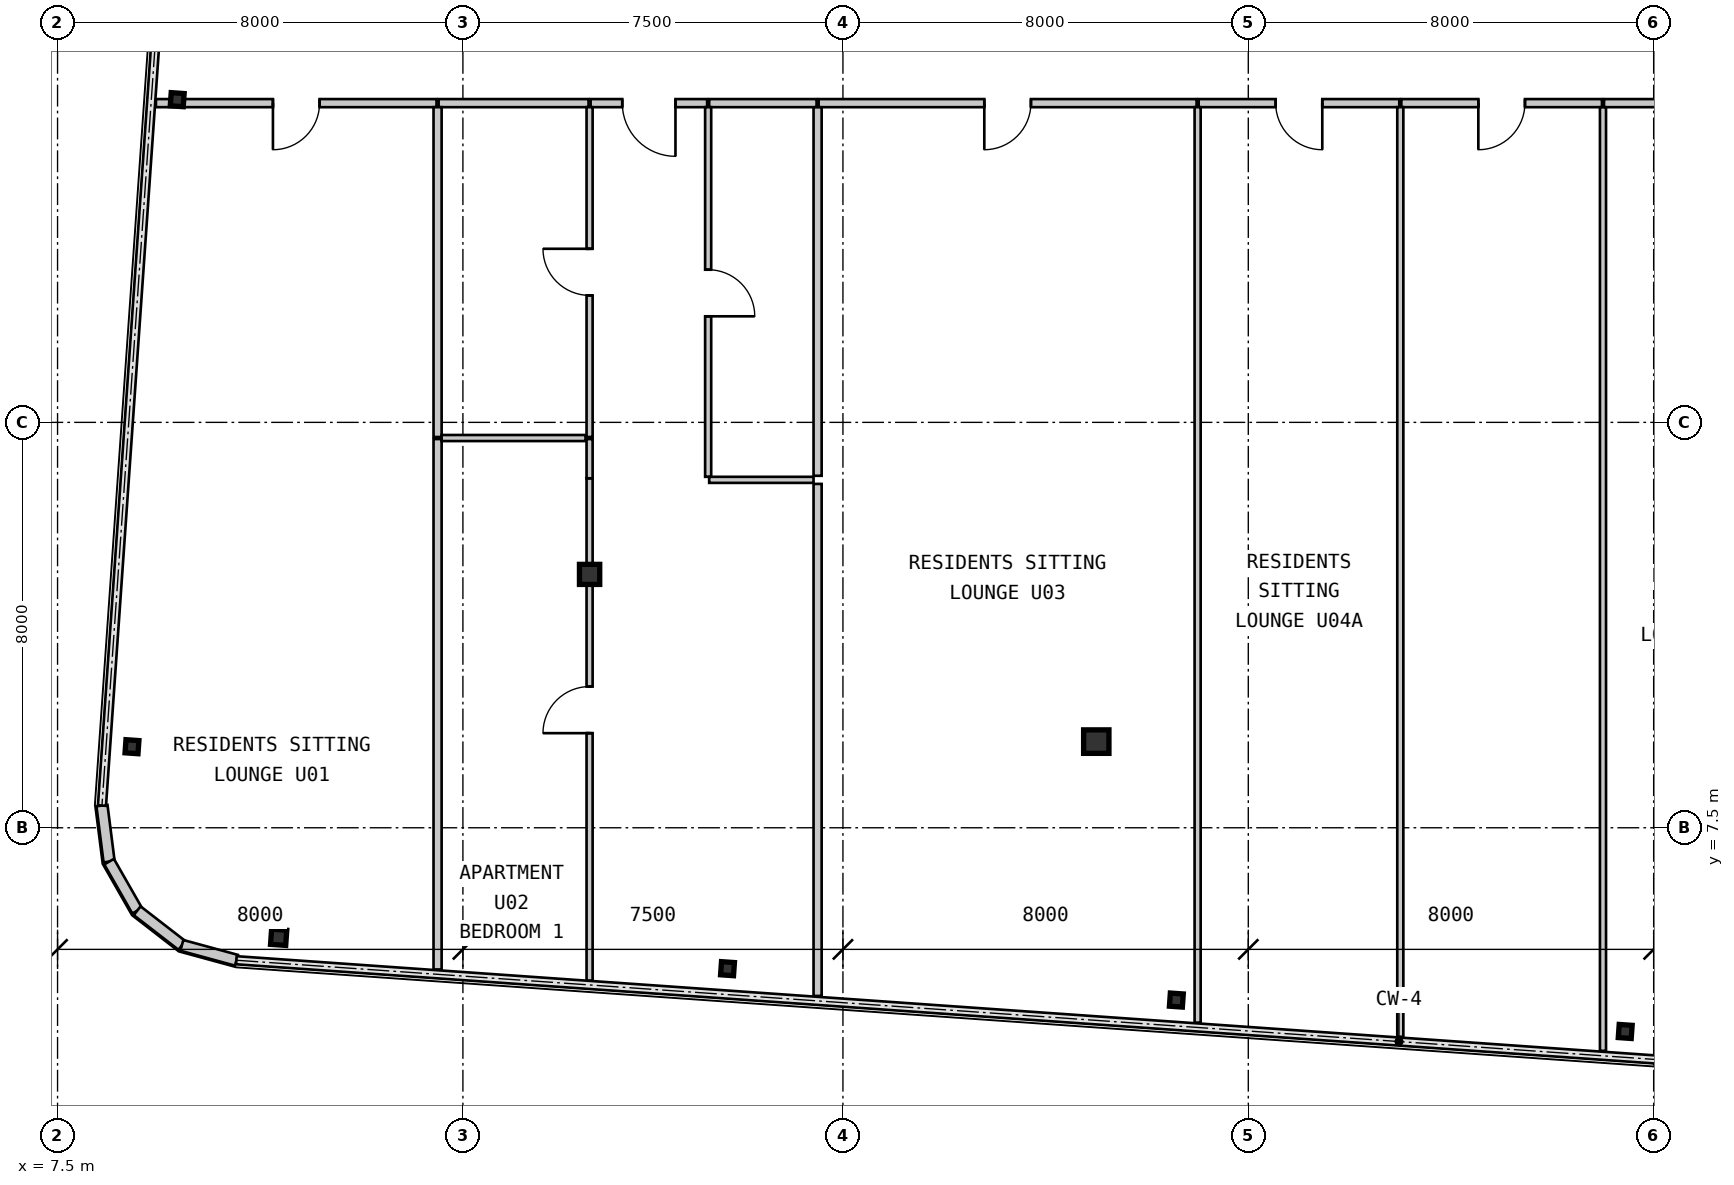
"""IFC4 building model, lengths in metres.
Left out: names, types, materials, properties, quantities, classifications, styles, units other than length and angle.
Written with IfcOpenShell. Run it as: python <this file> out.ifc"""

import sys

from ifc_helpers import new_model, si_unit, direction, frame, frame_2d, origin, origin_2d, place, context, subcontext, project, spatial, rectangle, hollow_rectangle, i_section, extrude, source, transform, mapped, element, fill, save


model = new_model("IFC4")
c1 = context("Model", 3, precision=1e-05, world=origin(), true_north=direction((0.0, 1.0)))
c2 = subcontext(c1, "Body", "Model", "MODEL_VIEW")
j1 = project(units=[si_unit("LENGTHUNIT", "METRE"), si_unit("PLANEANGLEUNIT", "RADIAN")], contexts=[c1])
p1 = place(None, origin())
s1 = spatial("IfcSite", under=j1, at=p1, CompositionType="ELEMENT")
p2 = place(p1, origin())
s2 = spatial("IfcBuilding", under=s1, at=p2, CompositionType="ELEMENT")
p3 = place(p2, frame((0.0, 0.0, 139.3)))
s3 = spatial("IfcBuildingStorey", under=s2, at=p3, CompositionType="ELEMENT", Elevation=139.3)
m1 = source(origin(), c2, "Body", "SweptSolid", [
    extrude(i_section(OverallWidth=0.5, OverallDepth=0.464, WebThickness=0.022, FlangeThickness=0.034, at=origin_2d()), origin(), (0.0, 0.0, 1.0), 3.15),
])
p4 = place(p3, frame((28.0, 9.2, 0.0), z_axis=(0.0, 0.0, 1.0), x_axis=(1.0, 0.0, 0.0)))
e1 = element("IfcColumn", 1, at=p4, inside=s3, PredefinedType="COLUMN", context=c2, shape_type="MappedRepresentation", body=[
    mapped(m1, transform((0.0, 0.0, 0.0), scale=1.0)),
])
m2 = source(origin(), c2, "Body", "SweptSolid", [
    extrude(i_section(OverallWidth=0.4, OverallDepth=0.396, WebThickness=0.022, FlangeThickness=0.034, at=origin_2d()), origin(), (0.0, 0.0, 1.0), 3.15),
])
p5 = place(p3, frame((18.0, 12.5, 0.0), z_axis=(0.0, 0.0, 1.0), x_axis=(1.0, 0.0, 0.0)))
e2 = element("IfcColumn", 2, at=p5, inside=s3, PredefinedType="COLUMN", context=c2, shape_type="MappedRepresentation", body=[
    mapped(m2, transform((0.0, 0.0, 0.0), scale=1.0)),
])
m3 = source(origin(), c2, "Body", "SweptSolid", [
    extrude(hollow_rectangle(XDim=0.3, YDim=0.3, WallThickness=0.012, at=origin_2d()), origin(), (0.0, 0.0, 1.0), 3.15),
])
p6 = place(p3, frame((11.864, 5.338, 0.0), z_axis=(0.0, 0.0, 1.0), x_axis=(0.99756405026, -0.069756473744, 0.0)))
e3 = element("IfcColumn", 3, at=p6, inside=s3, PredefinedType="COLUMN", context=c2, shape_type="MappedRepresentation", body=[
    mapped(m3, transform((0.0, 0.0, 0.0), scale=1.0)),
])
m4 = source(origin(), c2, "Body", "SweptSolid", [
    extrude(i_section(OverallWidth=0.256, OverallDepth=0.26, WebThickness=0.01, FlangeThickness=0.017, at=origin_2d()), origin(), (0.0, 0.0, 1.0), 3.15),
])
for number, where, z_axis, x_axis in (
    (4, (20.722, 4.719, 0.0), (0.0, 0.0, 1.0), (0.998, -0.07, 0.0)),
    (5, (29.58, 4.1, 0.0), (0.0, 0.0, 1.0), (0.998, -0.07, 0.0)),
    (6, (38.439, 3.48, 0.0), (0.0, 0.0, 1.0), (0.998, -0.07, 0.0)),
    (7, (8.969, 9.1, 0.0), (0.0, 0.0, 1.0), (0.998, -0.07, 0.0)),
    (8, (9.862, 21.868, 0.0), (0.0, 0.0, 1.0), (0.998, -0.07, 0.0)),
):
    element("IfcColumn", number, at=place(p3, frame(where, z_axis=z_axis, x_axis=x_axis)), inside=s3, PredefinedType="COLUMN", context=c2, shape_type="MappedRepresentation", body=[
        mapped(m4, transform((0.0, 0.0, 0.0), scale=1.0)),
    ])
m5 = source(origin(), c2, "Body", "SweptSolid", [
    extrude(rectangle(XDim=1.116, YDim=0.22, at=frame_2d((0.558, 0.0))), origin(), (0.0, 0.0, 1.0), 2.93),
])
for number, where, z_axis, x_axis in (
    (9, (8.376, 7.938, 0.0), (0.0, 0.0, 1.0), (0.126, -0.992, 0.0)),
    (10, (8.517, 6.831, 0.0), (0.0, 0.0, 1.0), (0.496, -0.868, 0.0)),
    (11, (9.071, 5.862, 0.0), (0.0, 0.0, 1.0), (0.791, -0.612, 0.0)),
    (12, (9.953, 5.179, 0.0), (0.0, 0.0, 1.0), (0.965, -0.263, 0.0)),
):
    element("IfcWall", number, at=place(p3, frame(where, z_axis=z_axis, x_axis=x_axis)), inside=s3, PredefinedType="SOLIDWALL", context=c2, shape_type="MappedRepresentation", body=[
        mapped(m5, transform((0.0, 0.0, 0.0), scale=1.0)),
    ])
m6 = source(origin(), c2, "Body", "SweptSolid", [
    extrude(rectangle(XDim=5.538, YDim=0.16, at=frame_2d((2.769, 0.0))), origin(), (0.0, 0.0, 1.0), 2.93),
])
p7 = place(p3, frame((14.98, 21.8, 0.0), z_axis=(0.0, 0.0, 1.0), x_axis=(-1.0, 0.0, 0.0)))
e13 = element("IfcWall", 13, at=p7, inside=s3, PredefinedType="PARTITIONING", context=c2, shape_type="MappedRepresentation", body=[
    mapped(m6, transform((0.0, 0.0, 0.0), scale=1.0)),
])
m7 = source(origin(), c2, "Body", "SweptSolid", [
    extrude(rectangle(XDim=0.92, YDim=2.1, at=frame_2d((0.46, 1.05))), frame((0.0, 0.09, 0.0), z_axis=(0.0, -1.0, 0.0), x_axis=(1.0, 0.0, 0.0)), (0.0, 0.0, 1.0), 0.18),
])
p8 = place(p7, frame((2.309, 0.0, 0.0)))
e14 = element("IfcOpeningElement", 14, at=p8, cuts=e13, PredefinedType="OPENING", context=c2, shape_type="MappedRepresentation", body=[
    mapped(m7, transform((0.0, 0.0, 0.0), scale=1.0)),
])
m8 = source(origin(), c2, "Body", "SweptSolid", [
    extrude(rectangle(XDim=2.3, YDim=0.16, at=frame_2d((1.15, 0.0))), origin(), (0.0, 0.0, 1.0), 2.93),
])
p9 = place(p3, frame((20.32, 21.8, 0.0), z_axis=(0.0, 0.0, 1.0), x_axis=(-1.0, 0.0, 0.0)))
e15 = element("IfcWall", 15, at=p9, inside=s3, PredefinedType="PARTITIONING", context=c2, shape_type="MappedRepresentation", body=[
    mapped(m8, transform((0.0, 0.0, 0.0), scale=1.0)),
])
m9 = source(origin(), c2, "Body", "SweptSolid", [
    extrude(rectangle(XDim=1.05, YDim=2.1, at=frame_2d((0.525, 1.05))), frame((0.0, 0.09, 0.0), z_axis=(0.0, -1.0, 0.0), x_axis=(1.0, 0.0, 0.0)), (0.0, 0.0, 1.0), 0.18),
])
p10 = place(p9, frame((0.625, 0.0, 0.0)))
e16 = element("IfcOpeningElement", 16, at=p10, cuts=e15, PredefinedType="OPENING", context=c2, shape_type="MappedRepresentation", body=[
    mapped(m9, transform((0.0, 0.0, 0.0), scale=1.0)),
])
m10 = source(origin(), c2, "Body", "SweptSolid", [
    extrude(rectangle(XDim=2.12, YDim=0.16, at=frame_2d((1.06, 0.0))), origin(), (0.0, 0.0, 1.0), 2.93),
])
p11 = place(p3, frame((22.48, 21.8, 0.0), z_axis=(0.0, 0.0, 1.0), x_axis=(-1.0, 0.0, 0.0)))
e17 = element("IfcWall", 17, at=p11, inside=s3, PredefinedType="PARTITIONING", context=c2, shape_type="MappedRepresentation", body=[
    mapped(m10, transform((0.0, 0.0, 0.0), scale=1.0)),
])
m11 = source(origin(), c2, "Body", "SweptSolid", [
    extrude(rectangle(XDim=2.959, YDim=0.16, at=frame_2d((1.48, 0.0))), origin(), (0.0, 0.0, 1.0), 2.93),
])
p12 = place(p3, frame((17.98, 21.8, 0.0), z_axis=(0.0, 0.0, 1.0), x_axis=(-1.0, 0.0, 0.0)))
e18 = element("IfcWall", 18, at=p12, inside=s3, PredefinedType="PARTITIONING", context=c2, shape_type="MappedRepresentation", body=[
    mapped(m11, transform((0.0, 0.0, 0.0), scale=1.0)),
])
m12 = source(origin(), c2, "Body", "SweptSolid", [
    extrude(rectangle(XDim=7.459, YDim=0.16, at=frame_2d((3.73, 0.0))), origin(), (0.0, 0.0, 1.0), 2.93),
])
p13 = place(p3, frame((29.98, 21.8, 0.0), z_axis=(0.0, 0.0, 1.0), x_axis=(-1.0, 0.0, 0.0)))
e19 = element("IfcWall", 19, at=p13, inside=s3, PredefinedType="PARTITIONING", context=c2, shape_type="MappedRepresentation", body=[
    mapped(m12, transform((0.0, 0.0, 0.0), scale=1.0)),
])
p14 = place(p13, frame((3.27, 0.0, 0.0)))
e20 = element("IfcOpeningElement", 20, at=p14, cuts=e19, PredefinedType="OPENING", context=c2, shape_type="MappedRepresentation", body=[
    mapped(m7, transform((0.0, 0.0, 0.0), scale=1.0)),
])
m13 = source(origin(), c2, "Body", "SweptSolid", [
    extrude(rectangle(XDim=3.959, YDim=0.16, at=frame_2d((1.98, 0.0))), origin(), (0.0, 0.0, 1.0), 2.93),
])
p15 = place(p3, frame((33.98, 21.8, 0.0), z_axis=(0.0, 0.0, 1.0), x_axis=(-1.0, 0.0, 0.0)))
e21 = element("IfcWall", 21, at=p15, inside=s3, PredefinedType="PARTITIONING", context=c2, shape_type="MappedRepresentation", body=[
    mapped(m13, transform((0.0, 0.0, 0.0), scale=1.0)),
])
p16 = place(p15, frame((1.52, 0.0, 0.0)))
e22 = element("IfcOpeningElement", 22, at=p16, cuts=e21, PredefinedType="OPENING", context=c2, shape_type="MappedRepresentation", body=[
    mapped(m7, transform((0.0, 0.0, 0.0), scale=1.0)),
])
p17 = place(p3, frame((37.98, 21.8, 0.0), z_axis=(0.0, 0.0, 1.0), x_axis=(-1.0, 0.0, 0.0)))
e23 = element("IfcWall", 23, at=p17, inside=s3, PredefinedType="PARTITIONING", context=c2, shape_type="MappedRepresentation", body=[
    mapped(m13, transform((0.0, 0.0, 0.0), scale=1.0)),
])
p18 = place(p17, frame((1.52, 0.0, 0.0)))
e24 = element("IfcOpeningElement", 24, at=p18, cuts=e23, PredefinedType="OPENING", context=c2, shape_type="MappedRepresentation", body=[
    mapped(m7, transform((0.0, 0.0, 0.0), scale=1.0)),
])
p19 = place(p3, frame((41.98, 21.8, 0.0), z_axis=(0.0, 0.0, 1.0), x_axis=(-1.0, 0.0, 0.0)))
e25 = element("IfcWall", 25, at=p19, inside=s3, PredefinedType="PARTITIONING", context=c2, shape_type="MappedRepresentation", body=[
    mapped(m13, transform((0.0, 0.0, 0.0), scale=1.0)),
])
p20 = place(p19, frame((1.52, 0.0, 0.0)))
e26 = element("IfcOpeningElement", 26, at=p20, cuts=e25, PredefinedType="OPENING", context=c2, shape_type="MappedRepresentation", body=[
    mapped(m7, transform((0.0, 0.0, 0.0), scale=1.0)),
])
m14 = source(origin(), c2, "Body", "SweptSolid", [
    extrude(rectangle(XDim=10.467, YDim=0.16, at=frame_2d((5.234, 0.0))), origin(), (0.0, 0.0, 1.0), 2.93),
])
p21 = place(p3, frame((15.0, 15.171, 0.0), z_axis=(0.0, 0.0, 1.0), x_axis=(0.0, -1.0, 0.0)))
e27 = element("IfcWall", 27, at=p21, inside=s3, PredefinedType="PARTITIONING", context=c2, shape_type="MappedRepresentation", body=[
    mapped(m14, transform((0.0, 0.0, 0.0), scale=1.0)),
])
m15 = source(origin(), c2, "Body", "SweptSolid", [
    extrude(rectangle(XDim=6.509, YDim=0.16, at=frame_2d((3.254, 0.0))), origin(), (0.0, 0.0, 1.0), 2.93),
])
p22 = place(p3, frame((15.0, 21.72, 0.0), z_axis=(0.0, 0.0, 1.0), x_axis=(0.0, -1.0, 0.0)))
e28 = element("IfcWall", 28, at=p22, inside=s3, PredefinedType="PARTITIONING", context=c2, shape_type="MappedRepresentation", body=[
    mapped(m15, transform((0.0, 0.0, 0.0), scale=1.0)),
])
m16 = source(origin(), c2, "Body", "SweptSolid", [
    extrude(rectangle(XDim=7.294, YDim=0.12, at=frame_2d((3.647, 0.0))), origin(), (0.0, 0.0, 1.0), 2.93),
])
p23 = place(p3, frame((20.34, 21.72, 0.0), z_axis=(0.0, 0.0, 1.0), x_axis=(0.0, -1.0, 0.0)))
e29 = element("IfcWall", 29, at=p23, inside=s3, PredefinedType="PARTITIONING", context=c2, shape_type="MappedRepresentation", body=[
    mapped(m16, transform((0.0, 0.0, 0.0), scale=1.0)),
])
m17 = source(origin(), c2, "Body", "SweptSolid", [
    extrude(rectangle(XDim=0.92, YDim=2.1, at=frame_2d((0.46, 1.05))), frame((0.0, 0.07, 0.0), z_axis=(0.0, -1.0, 0.0), x_axis=(1.0, 0.0, 0.0)), (0.0, 0.0, 1.0), 0.14),
])
p24 = place(p23, frame((3.207, 0.0, 0.0)))
e30 = element("IfcOpeningElement", 30, at=p24, cuts=e29, PredefinedType="OPENING", context=c2, shape_type="MappedRepresentation", body=[
    mapped(m17, transform((0.0, 0.0, 0.0), scale=1.0)),
])
m18 = source(origin(), c2, "Body", "SweptSolid", [
    extrude(rectangle(XDim=2.06, YDim=0.12, at=frame_2d((1.03, 0.0))), origin(), (0.0, 0.0, 1.0), 2.93),
])
p25 = place(p3, frame((20.36, 14.366, 0.0), z_axis=(0.0, 0.0, 1.0), x_axis=(1.0, 0.0, 0.0)))
e31 = element("IfcWall", 31, at=p25, inside=s3, PredefinedType="PARTITIONING", context=c2, shape_type="MappedRepresentation", body=[
    mapped(m18, transform((0.0, 0.0, 0.0), scale=1.0)),
])
m19 = source(origin(), c2, "Body", "SweptSolid", [
    extrude(rectangle(XDim=8.012, YDim=0.12, at=frame_2d((4.006, 0.0))), origin(), (0.0, 0.0, 1.0), 2.93),
])
p26 = place(p3, frame((18.0, 4.483, 0.0), z_axis=(0.0, 0.0, 1.0), x_axis=(0.0, 1.0, 0.0)))
e32 = element("IfcWall", 32, at=p26, inside=s3, PredefinedType="PARTITIONING", context=c2, shape_type="MappedRepresentation", body=[
    mapped(m19, transform((0.0, 0.0, 0.0), scale=1.0)),
])
p27 = place(p26, frame((4.884, 0.0, 0.0)))
e33 = element("IfcOpeningElement", 33, at=p27, cuts=e32, PredefinedType="OPENING", context=c2, shape_type="MappedRepresentation", body=[
    mapped(m17, transform((0.0, 0.0, 0.0), scale=1.0)),
])
m20 = source(origin(), c2, "Body", "SweptSolid", [
    extrude(rectangle(XDim=1.901, YDim=0.12, at=frame_2d((0.951, 0.0))), origin(), (0.0, 0.0, 1.0), 2.397),
])
p28 = place(p3, frame((18.0, 12.495, 0.0), z_axis=(0.0, 0.0, 1.0), x_axis=(0.0, 1.0, 0.0)))
e34 = element("IfcWall", 34, at=p28, inside=s3, PredefinedType="PARTITIONING", context=c2, shape_type="MappedRepresentation", body=[
    mapped(m20, transform((0.0, 0.0, 0.0), scale=1.0)),
])
m21 = source(origin(), c2, "Body", "SweptSolid", [
    extrude(rectangle(XDim=0.775, YDim=0.12, at=frame_2d((0.387, 0.0))), origin(), (0.0, 0.0, 1.0), 2.93),
])
p29 = place(p3, frame((18.0, 14.396, 0.0), z_axis=(0.0, 0.0, 1.0), x_axis=(0.0, 1.0, 0.0)))
e35 = element("IfcWall", 35, at=p29, inside=s3, PredefinedType="PARTITIONING", context=c2, shape_type="MappedRepresentation", body=[
    mapped(m21, transform((0.0, 0.0, 0.0), scale=1.0)),
])
m22 = source(origin(), c2, "Body", "SweptSolid", [
    extrude(rectangle(XDim=6.509, YDim=0.12, at=frame_2d((3.254, 0.0))), origin(), (0.0, 0.0, 1.0), 2.93),
])
p30 = place(p3, frame((18.0, 15.211, 0.0), z_axis=(0.0, 0.0, 1.0), x_axis=(0.0, 1.0, 0.0)))
e36 = element("IfcWall", 36, at=p30, inside=s3, PredefinedType="PARTITIONING", context=c2, shape_type="MappedRepresentation", body=[
    mapped(m22, transform((0.0, 0.0, 0.0), scale=1.0)),
])
p31 = place(p30, frame((2.794, 0.0, 0.0)))
e37 = element("IfcOpeningElement", 37, at=p31, cuts=e36, PredefinedType="OPENING", context=c2, shape_type="MappedRepresentation", body=[
    mapped(m17, transform((0.0, 0.0, 0.0), scale=1.0)),
])
m23 = source(origin(), c2, "Body", "SweptSolid", [
    extrude(rectangle(XDim=10.104, YDim=0.16, at=frame_2d((5.052, 0.0))), origin(), (0.0, 0.0, 1.0), 2.93),
])
p32 = place(p3, frame((22.5, 14.286, 0.0), z_axis=(0.0, 0.0, 1.0), x_axis=(0.0, -1.0, 0.0)))
e38 = element("IfcWall", 38, at=p32, inside=s3, PredefinedType="PARTITIONING", context=c2, shape_type="MappedRepresentation", body=[
    mapped(m23, transform((0.0, 0.0, 0.0), scale=1.0)),
])
m24 = source(origin(), c2, "Body", "SweptSolid", [
    extrude(rectangle(XDim=7.272, YDim=0.16, at=frame_2d((3.636, 0.0))), origin(), (0.0, 0.0, 1.0), 2.93),
])
p33 = place(p3, frame((22.5, 21.718, 0.0), z_axis=(0.0, 0.0, 1.0), x_axis=(0.0, -1.0, 0.0)))
e39 = element("IfcWall", 39, at=p33, inside=s3, PredefinedType="PARTITIONING", context=c2, shape_type="MappedRepresentation", body=[
    mapped(m24, transform((0.0, 0.0, 0.0), scale=1.0)),
])
m25 = source(origin(), c2, "Body", "SweptSolid", [
    extrude(rectangle(XDim=2.84, YDim=0.12, at=frame_2d((1.42, 0.0))), origin(), (0.0, 0.0, 1.0), 2.93),
])
p34 = place(p3, frame((15.08, 15.191, 0.0), z_axis=(0.0, 0.0, 1.0), x_axis=(1.0, 0.0, 0.0)))
e40 = element("IfcWall", 40, at=p34, inside=s3, PredefinedType="PARTITIONING", context=c2, shape_type="MappedRepresentation", body=[
    mapped(m25, transform((0.0, 0.0, 0.0), scale=1.0)),
])
m26 = source(origin(), c2, "Body", "SweptSolid", [
    extrude(rectangle(XDim=18.065, YDim=0.12, at=frame_2d((9.033, 0.0))), origin(), (0.0, 0.0, 1.0), 2.93),
])
p35 = place(p3, frame((30.0, 21.72, 0.0), z_axis=(0.0, 0.0, 1.0), x_axis=(0.0, -1.0, 0.0)))
e41 = element("IfcWall", 41, at=p35, inside=s3, PredefinedType="PARTITIONING", context=c2, shape_type="MappedRepresentation", body=[
    mapped(m26, transform((0.0, 0.0, 0.0), scale=1.0)),
])
m27 = source(origin(), c2, "Body", "SweptSolid", [
    extrude(rectangle(XDim=18.345, YDim=0.12, at=frame_2d((9.172, 0.0))), origin(), (0.0, 0.0, 1.0), 2.93),
])
p36 = place(p3, frame((34.0, 21.72, 0.0), z_axis=(0.0, 0.0, 1.0), x_axis=(0.0, -1.0, 0.0)))
e42 = element("IfcWall", 42, at=p36, inside=s3, PredefinedType="PARTITIONING", context=c2, shape_type="MappedRepresentation", body=[
    mapped(m27, transform((0.0, 0.0, 0.0), scale=1.0)),
])
m28 = source(origin(), c2, "Body", "SweptSolid", [
    extrude(rectangle(XDim=18.621, YDim=0.12, at=frame_2d((9.31, 0.0))), origin(), (0.0, 0.0, 1.0), 2.93),
])
p37 = place(p3, frame((38.0, 21.718, 0.0), z_axis=(0.0, 0.0, 1.0), x_axis=(0.0, -1.0, 0.0)))
e43 = element("IfcWall", 43, at=p37, inside=s3, PredefinedType="PARTITIONING", context=c2, shape_type="MappedRepresentation", body=[
    mapped(m28, transform((0.0, 0.0, 0.0), scale=1.0)),
])
m29 = source(origin(), c2, "Body", "SweptSolid", [
    extrude(rectangle(XDim=0.92, YDim=2.1, at=frame_2d((0.46, 1.05))), frame((0.0, 0.025, 0.0), z_axis=(0.0, -1.0, 0.0), x_axis=(1.0, 0.0, 0.0)), (0.0, 0.0, 1.0), 0.05),
])
p38 = place(p8, origin())
e44 = element("IfcDoor", 44, at=p38, inside=s3, OperationType="SINGLE_SWING_RIGHT", PredefinedType="DOOR", context=c2, shape_type="MappedRepresentation", body=[
    mapped(m29, transform((0.0, 0.0, 0.0), scale=1.0)),
])
fill(e14, e44)
m30 = source(origin(), c2, "Body", "SweptSolid", [
    extrude(rectangle(XDim=1.05, YDim=2.1, at=frame_2d((0.525, 1.05))), frame((0.0, 0.025, 0.0), z_axis=(0.0, -1.0, 0.0), x_axis=(1.0, 0.0, 0.0)), (0.0, 0.0, 1.0), 0.05),
])
p39 = place(p10, origin())
e45 = element("IfcDoor", 45, at=p39, inside=s3, OperationType="SINGLE_SWING_LEFT", PredefinedType="DOOR", context=c2, shape_type="MappedRepresentation", body=[
    mapped(m30, transform((0.0, 0.0, 0.0), scale=1.0)),
])
fill(e16, e45)
p40 = place(p14, origin())
e46 = element("IfcDoor", 46, at=p40, inside=s3, OperationType="SINGLE_SWING_RIGHT", PredefinedType="DOOR", context=c2, shape_type="MappedRepresentation", body=[
    mapped(m29, transform((0.0, 0.0, 0.0), scale=1.0)),
])
fill(e20, e46)
p41 = place(p16, origin())
e47 = element("IfcDoor", 47, at=p41, inside=s3, OperationType="SINGLE_SWING_LEFT", PredefinedType="DOOR", context=c2, shape_type="MappedRepresentation", body=[
    mapped(m29, transform((0.0, 0.0, 0.0), scale=1.0)),
])
fill(e22, e47)
p42 = place(p18, origin())
e48 = element("IfcDoor", 48, at=p42, inside=s3, OperationType="SINGLE_SWING_RIGHT", PredefinedType="DOOR", context=c2, shape_type="MappedRepresentation", body=[
    mapped(m29, transform((0.0, 0.0, 0.0), scale=1.0)),
])
fill(e24, e48)
p43 = place(p24, origin())
e49 = element("IfcDoor", 49, at=p43, inside=s3, OperationType="SINGLE_SWING_RIGHT", PredefinedType="DOOR", context=c2, shape_type="MappedRepresentation", body=[
    mapped(m29, transform((0.0, 0.0, 0.0), scale=1.0)),
])
fill(e30, e49)
p44 = place(p27, origin())
e50 = element("IfcDoor", 50, at=p44, inside=s3, OperationType="SINGLE_SWING_LEFT", PredefinedType="DOOR", context=c2, shape_type="MappedRepresentation", body=[
    mapped(m29, transform((0.0, 0.0, 0.0), scale=1.0)),
])
fill(e33, e50)
p45 = place(p31, origin())
e51 = element("IfcDoor", 51, at=p45, inside=s3, OperationType="SINGLE_SWING_RIGHT", PredefinedType="DOOR", context=c2, shape_type="MappedRepresentation", body=[
    mapped(m29, transform((0.0, 0.0, 0.0), scale=1.0)),
])
fill(e37, e51)
save(model, sys.argv[1])
